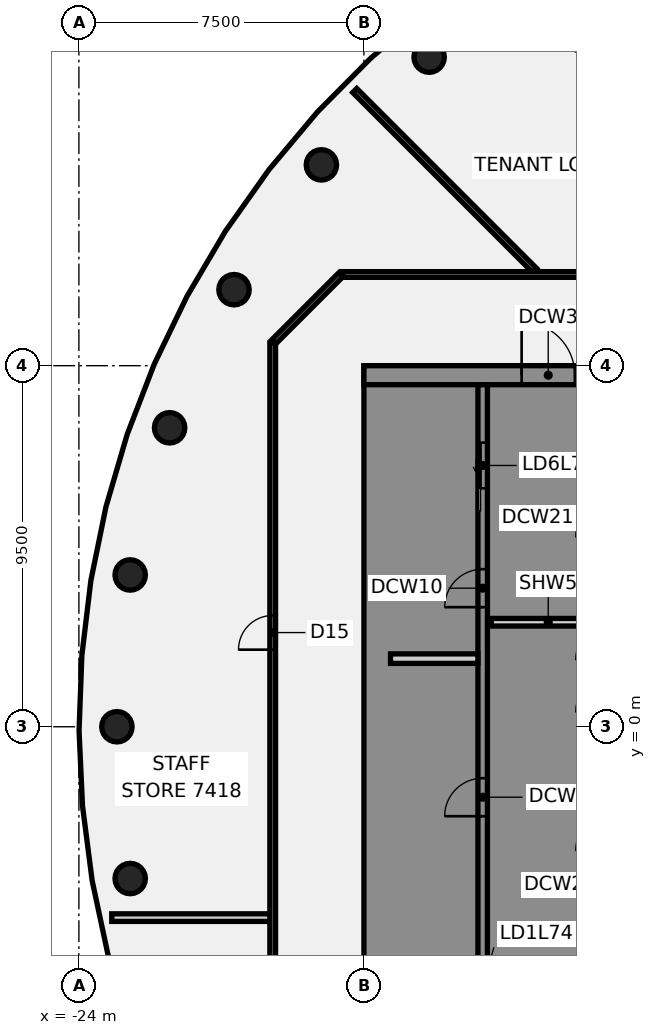
"""IFC4 building model, lengths in metres.
Left out: names, types, materials, properties, quantities, classifications, styles, units other than length and angle.
Written with IfcOpenShell. Run it as: python <this file> out.ifc"""

import sys

from ifc_helpers import new_model, si_unit, direction, frame, frame_2d, origin, origin_2d, place, context, subcontext, project, spatial, polyline, rectangle, circle, outline, extrude, element, fill, save


model = new_model("IFC4")
c1 = context("Model", 3, precision=1e-05, world=origin(), true_north=direction((0.0, 1.0)))
c2 = subcontext(c1, "Body", "Model", "MODEL_VIEW")
j1 = project(units=[si_unit("LENGTHUNIT", "METRE"), si_unit("PLANEANGLEUNIT", "RADIAN")], contexts=[c1])
p1 = place(None, origin())
s1 = spatial("IfcSite", under=j1, at=p1, CompositionType="ELEMENT")
p2 = place(p1, origin())
s2 = spatial("IfcBuilding", under=s1, at=p2, CompositionType="ELEMENT")
p3 = place(p2, frame((0.0, 0.0, 299.4)))
s3 = spatial("IfcBuildingStorey", under=s2, at=p3, CompositionType="ELEMENT", Elevation=299.4)
for number, where, z_axis, x_axis in (
    (1, (-14.784, 17.619, -0.25), (0.0, 0.0, 1.0), (1.0, 0.0, 0.0)),
    (2, (-17.619, 14.784, -0.25), (0.0, 0.0, 1.0), (1.0, 0.0, 0.0)),
    (3, (-19.919, 11.5, -0.25), (0.0, 0.0, 1.0), (1.0, 0.0, 0.0)),
    (4, (-21.613, 7.866, -0.25), (0.0, 0.0, 1.0), (1.0, 0.0, 0.0)),
    (5, (-22.651, 3.994, -0.25), (0.0, 0.0, 1.0), (1.0, 0.0, 0.0)),
    (6, (-23.0, 0.0, -0.25), (0.0, 0.0, 1.0), (1.0, 0.0, 0.0)),
    (7, (-22.651, -3.994, -0.25), (0.0, 0.0, 1.0), (1.0, 0.0, 0.0)),
):
    element("IfcColumn", number, at=place(p3, frame(where, z_axis=z_axis, x_axis=x_axis)), inside=s3, PredefinedType="COLUMN", context=c2, shape_type="SweptSolid", body=[
        extrude(circle(Radius=0.4, at=origin_2d()), origin(), (0.0, 0.0, 1.0), 6.07),
    ])
p4 = place(p3, frame((-16.74, 16.74, 0.0), z_axis=(0.0, 0.0, 1.0), x_axis=(0.707106781187, -0.707106781187, 0.0)))
e8 = element("IfcWall", 8, at=p4, inside=s3, PredefinedType="PARTITIONING", context=c2, shape_type="SweptSolid", body=[
    extrude(rectangle(XDim=6.691, YDim=0.15, at=frame_2d((3.345, 0.0))), origin(), (0.0, 0.0, 1.0), 5.02),
])
p5 = place(p3, frame((-14.271, 19.106, 0.0), z_axis=(0.0, 0.0, 1.0), x_axis=(0.939707995486, -0.34197789873, 0.0)))
e9 = element("IfcWall", 9, at=p5, inside=s3, PredefinedType="PARTITIONING", context=c2, shape_type="SweptSolid", body=[
    extrude(rectangle(XDim=20.7, YDim=0.15, at=frame_2d((10.35, 0.0))), origin(), (0.0, 0.0, 1.0), 5.02),
])
p6 = place(p3, frame((-23.136, -5.022, 0.0), z_axis=(0.0, 0.0, 1.0), x_axis=(1.0, 0.0, 0.0)))
e10 = element("IfcWall", 10, at=p6, inside=s3, PredefinedType="PARTITIONING", context=c2, shape_type="SweptSolid", body=[
    extrude(rectangle(XDim=4.181, YDim=0.2, at=frame_2d((2.09, 0.0))), origin(), (0.0, 0.0, 1.0), 5.02),
])
p7 = place(p3, frame((-17.065, 11.9, 0.0), z_axis=(0.0, 0.0, 1.0), x_axis=(1.0, 0.0, 0.0)))
e11 = element("IfcWall", 11, at=p7, inside=s3, PredefinedType="PARTITIONING", context=c2, shape_type="SweptSolid", body=[
    extrude(rectangle(XDim=34.165, YDim=0.15, at=frame_2d((17.083, 0.0))), origin(), (0.0, 0.0, 1.0), 5.02),
])
p8 = place(p7, frame((24.544, 0.0, 0.0)))
e12 = element("IfcOpeningElement", 12, at=p8, cuts=e11, PredefinedType="OPENING", context=c2, shape_type="SweptSolid", body=[
    extrude(rectangle(XDim=1.8, YDim=2.1, at=frame_2d((0.9, 1.05))), frame((0.0, 0.085, 0.0), z_axis=(0.0, -1.0, 0.0), x_axis=(1.0, 0.0, 0.0)), (0.0, 0.0, 1.0), 0.17),
])
p9 = place(p7, frame((15.365, 0.0, 0.0)))
e13 = element("IfcOpeningElement", 13, at=p9, cuts=e11, PredefinedType="OPENING", context=c2, shape_type="SweptSolid", body=[
    extrude(rectangle(XDim=1.8, YDim=2.1, at=frame_2d((0.9, 1.05))), frame((0.0, 0.085, 0.0), z_axis=(0.0, -1.0, 0.0), x_axis=(1.0, 0.0, 0.0)), (0.0, 0.0, 1.0), 0.17),
])
p10 = place(p3, frame((-18.872, 10.128, 0.0), z_axis=(0.0, 0.0, 1.0), x_axis=(0.707106781187, 0.707106781187, 0.0)))
e14 = element("IfcWall", 14, at=p10, inside=s3, PredefinedType="PARTITIONING", context=c2, shape_type="SweptSolid", body=[
    extrude(rectangle(XDim=2.505, YDim=0.15, at=frame_2d((1.253, 0.0))), origin(), (0.0, 0.0, 1.0), 5.02),
])
p11 = place(p3, frame((-18.9, -10.1, 0.0), z_axis=(0.0, 0.0, 1.0), x_axis=(0.0, 1.0, 0.0)))
e15 = element("IfcWall", 15, at=p11, inside=s3, PredefinedType="PARTITIONING", context=c2, shape_type="SweptSolid", body=[
    extrude(rectangle(XDim=20.2, YDim=0.15, at=frame_2d((10.1, 0.0))), origin(), (0.0, 0.0, 1.0), 5.02),
])
p12 = place(p11, frame((12.128, 0.0, 0.0)))
e16 = element("IfcOpeningElement", 16, at=p12, cuts=e15, PredefinedType="OPENING", context=c2, shape_type="SweptSolid", body=[
    extrude(rectangle(XDim=0.9, YDim=2.1, at=frame_2d((0.45, 1.05))), frame((0.0, 0.085, 0.0), z_axis=(0.0, -1.0, 0.0), x_axis=(1.0, 0.0, 0.0)), (0.0, 0.0, 1.0), 0.17),
])
p13 = place(p3, frame((-16.5, 9.25, 0.0), z_axis=(0.0, 0.0, 1.0), x_axis=(1.0, 0.0, 0.0)))
e17 = element("IfcWall", 17, at=p13, inside=s3, PredefinedType="SHEAR", context=c2, shape_type="SweptSolid", body=[
    extrude(rectangle(XDim=13.0, YDim=0.5, at=frame_2d((6.5, 0.0))), origin(), (0.0, 0.0, 1.0), 5.82),
])
p14 = place(p13, frame((4.15, 0.0, 0.0)))
e18 = element("IfcOpeningElement", 18, at=p14, cuts=e17, PredefinedType="OPENING", context=c2, shape_type="SweptSolid", body=[
    extrude(rectangle(XDim=1.4, YDim=2.1, at=frame_2d((0.7, 1.05))), frame((0.0, 0.26, 0.0), z_axis=(0.0, -1.0, 0.0), x_axis=(1.0, 0.0, 0.0)), (0.0, 0.0, 1.0), 0.52),
])
p15 = place(p3, frame((-13.15, 2.75, 0.0), z_axis=(0.0, 0.0, 1.0), x_axis=(1.0, 0.0, 0.0)))
e19 = element("IfcWall", 19, at=p15, inside=s3, PredefinedType="PARTITIONING", context=c2, shape_type="SweptSolid", body=[
    extrude(rectangle(XDim=3.0, YDim=0.2, at=frame_2d((1.5, 0.0))), origin(), (0.0, 0.0, 1.0), 5.82),
])
p16 = place(p3, origin())
e20 = element("IfcWall", 20, at=p16, inside=s3, PredefinedType="SHEAR", context=c2, shape_type="SweptSolid", body=[
    extrude(outline(polyline([(-13.5, -8.125), (-16.0, -8.125), (-16.0, -5.625), (-13.5, -5.625), (-13.5, -5.375), (-16.0, -5.375), (-16.0, 5.375), (-13.5, 5.375), (-13.5, 5.625), (-16.0, 5.625), (-16.0, 8.125), (-13.5, 8.125), (-13.5, 9.0), (-16.0, 9.0), (-16.5, 9.0), (-16.5, -9.0), (-16.0, -9.0), (-13.5, -9.0), (-13.5, -8.125)])), origin(), (0.0, 0.0, 1.0), 5.82),
])
p17 = place(p3, frame((-13.375, -9.0, 0.0), z_axis=(0.0, 0.0, 1.0), x_axis=(0.0, 1.0, 0.0)))
e21 = element("IfcWall", 21, at=p17, inside=s3, PredefinedType="SHEAR", context=c2, shape_type="SweptSolid", body=[
    extrude(rectangle(XDim=18.0, YDim=0.25, at=frame_2d((9.0, 0.0))), origin(), (0.0, 0.0, 1.0), 5.82),
])
p18 = place(p17, frame((1.425, 0.0, 0.0)))
e22 = element("IfcOpeningElement", 22, at=p18, cuts=e21, PredefinedType="OPENING", context=c2, shape_type="SweptSolid", body=[
    extrude(rectangle(XDim=1.4, YDim=2.1, at=frame_2d((0.7, 1.05))), frame((0.0, 0.135, 0.0), z_axis=(0.0, -1.0, 0.0), x_axis=(1.0, 0.0, 0.0)), (0.0, 0.0, 1.0), 0.27),
])
p19 = place(p17, frame((15.275, 0.0, 0.0)))
e23 = element("IfcOpeningElement", 23, at=p19, cuts=e21, PredefinedType="OPENING", context=c2, shape_type="SweptSolid", body=[
    extrude(rectangle(XDim=1.2, YDim=2.1, at=frame_2d((0.6, 1.05))), frame((0.0, 0.135, 0.0), z_axis=(0.0, -1.0, 0.0), x_axis=(1.0, 0.0, 0.0)), (0.0, 0.0, 1.0), 0.27),
])
p20 = place(p17, frame((6.646, 0.0, 0.0)))
e24 = element("IfcOpeningElement", 24, at=p20, cuts=e21, PredefinedType="OPENING", context=c2, shape_type="SweptSolid", body=[
    extrude(rectangle(XDim=1.0, YDim=2.1, at=frame_2d((0.5, 1.05))), frame((0.0, 0.135, 0.0), z_axis=(0.0, -1.0, 0.0), x_axis=(1.0, 0.0, 0.0)), (0.0, 0.0, 1.0), 0.27),
])
p21 = place(p17, frame((12.146, 0.0, 0.0)))
e25 = element("IfcOpeningElement", 25, at=p21, cuts=e21, PredefinedType="OPENING", context=c2, shape_type="SweptSolid", body=[
    extrude(rectangle(XDim=1.0, YDim=2.1, at=frame_2d((0.5, 1.05))), frame((0.0, 0.135, 0.0), z_axis=(0.0, -1.0, 0.0), x_axis=(1.0, 0.0, 0.0)), (0.0, 0.0, 1.0), 0.27),
])
p22 = place(p3, frame((-15.8, 1.792, 0.0), z_axis=(0.0, 0.0, 1.0), x_axis=(1.0, 0.0, 0.0)))
e26 = element("IfcWall", 26, at=p22, inside=s3, PredefinedType="PARTITIONING", context=c2, shape_type="SweptSolid", body=[
    extrude(rectangle(XDim=2.3, YDim=0.25, at=frame_2d((1.15, 0.0))), origin(), (0.0, 0.0, 1.0), 5.82),
])
p23 = place(p12, origin())
e27 = element("IfcDoor", 27, at=p23, inside=s3, OperationType="SINGLE_SWING_LEFT", PredefinedType="DOOR", context=c2, shape_type="SweptSolid", body=[
    extrude(rectangle(XDim=0.9, YDim=2.1, at=frame_2d((0.45, 1.05))), frame((0.0, 0.025, 0.0), z_axis=(0.0, -1.0, 0.0), x_axis=(1.0, 0.0, 0.0)), (0.0, 0.0, 1.0), 0.05),
])
fill(e16, e27)
p24 = place(p14, origin())
e28 = element("IfcDoor", 28, at=p24, inside=s3, OperationType="SINGLE_SWING_LEFT", PredefinedType="DOOR", context=c2, shape_type="SweptSolid", body=[
    extrude(rectangle(XDim=1.4, YDim=2.1, at=frame_2d((0.7, 1.05))), frame((0.0, 0.025, 0.0), z_axis=(0.0, -1.0, 0.0), x_axis=(1.0, 0.0, 0.0)), (0.0, 0.0, 1.0), 0.05),
])
fill(e18, e28)
p25 = place(p19, origin())
e29 = element("IfcDoor", 29, at=p25, inside=s3, OperationType="SLIDING_TO_LEFT", PredefinedType="DOOR", context=c2, shape_type="SweptSolid", body=[
    extrude(rectangle(XDim=1.2, YDim=2.1, at=frame_2d((0.6, 1.05))), frame((0.0, 0.025, 0.0), z_axis=(0.0, -1.0, 0.0), x_axis=(1.0, 0.0, 0.0)), (0.0, 0.0, 1.0), 0.05),
])
fill(e23, e29)
p26 = place(p20, origin())
e30 = element("IfcDoor", 30, at=p26, inside=s3, OperationType="SINGLE_SWING_LEFT", PredefinedType="DOOR", context=c2, shape_type="SweptSolid", body=[
    extrude(rectangle(XDim=1.0, YDim=2.1, at=frame_2d((0.5, 1.05))), frame((0.0, 0.025, 0.0), z_axis=(0.0, -1.0, 0.0), x_axis=(1.0, 0.0, 0.0)), (0.0, 0.0, 1.0), 0.05),
])
fill(e24, e30)
p27 = place(p21, origin())
e31 = element("IfcDoor", 31, at=p27, inside=s3, OperationType="SINGLE_SWING_LEFT", PredefinedType="DOOR", context=c2, shape_type="SweptSolid", body=[
    extrude(rectangle(XDim=1.0, YDim=2.1, at=frame_2d((0.5, 1.05))), frame((0.0, 0.025, 0.0), z_axis=(0.0, -1.0, 0.0), x_axis=(1.0, 0.0, 0.0)), (0.0, 0.0, 1.0), 0.05),
])
fill(e25, e31)
save(model, sys.argv[1])
